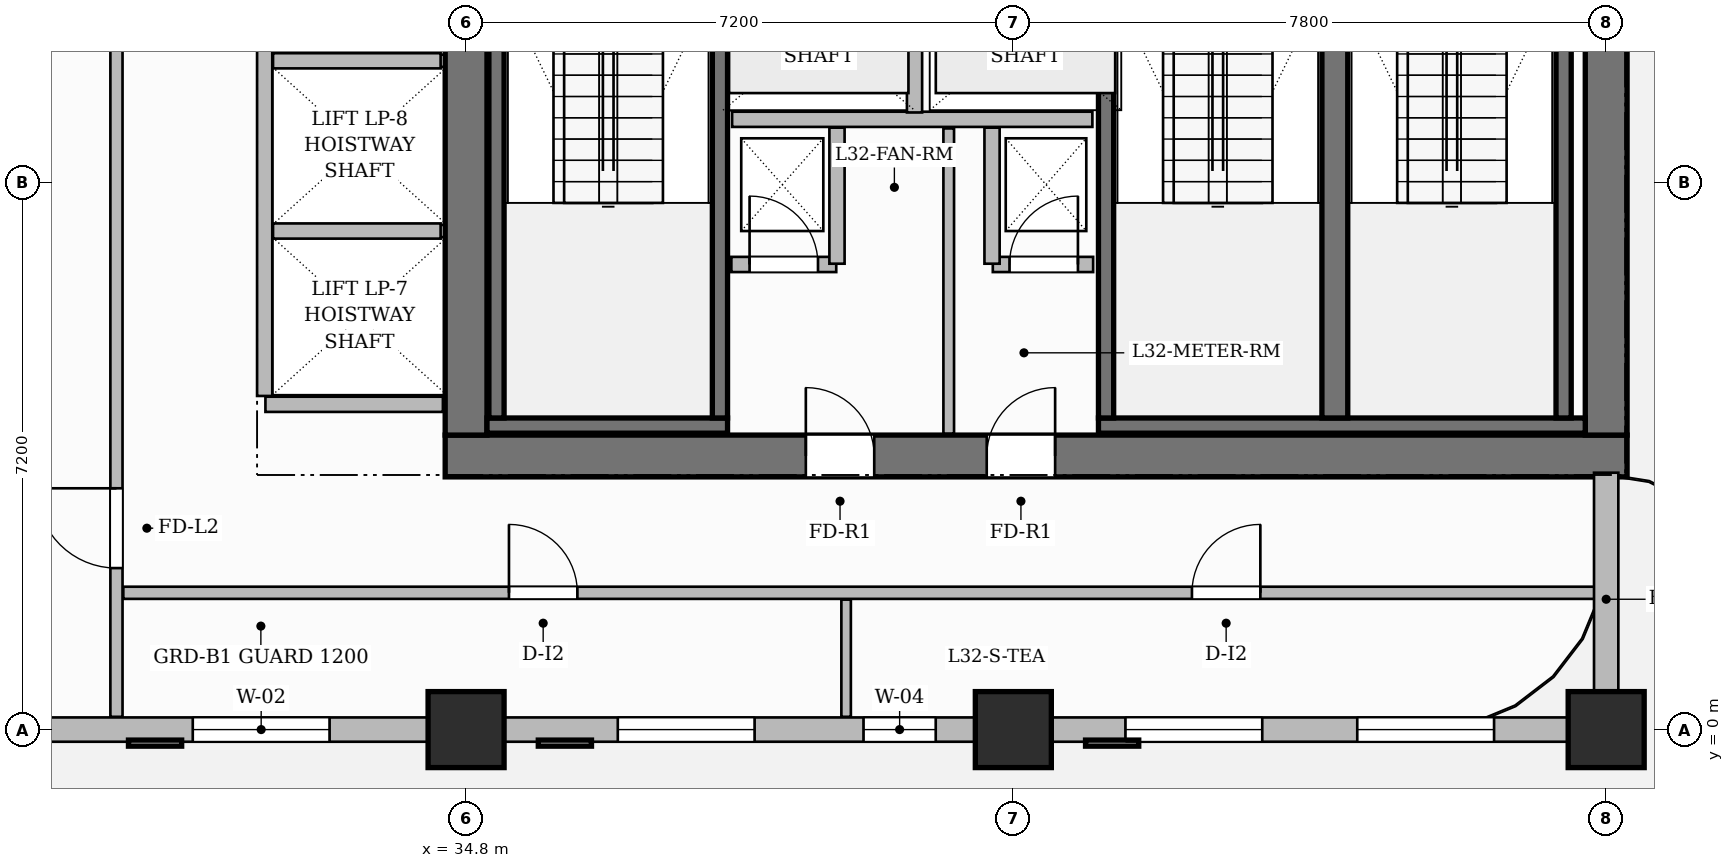
"""IFC4 building model, lengths in metres.
Left out: names, types, materials, properties, quantities, classifications, styles, units other than length and angle.
Written with IfcOpenShell. Run it as: python <this file> out.ifc"""

import sys

from ifc_helpers import new_model, si_unit, direction, frame, frame_2d, origin, origin_2d, place, context, subcontext, project, spatial, rectangle, extrude, source, transform, mapped, element, fill, save


model = new_model("IFC4")
c1 = context("Model", 3, precision=1e-05, world=origin(), true_north=direction((0.0, 1.0)))
c2 = subcontext(c1, "Body", "Model", "MODEL_VIEW")
j1 = project(units=[si_unit("LENGTHUNIT", "METRE"), si_unit("PLANEANGLEUNIT", "RADIAN")], contexts=[c1])
p1 = place(None, origin())
s1 = spatial("IfcSite", under=j1, at=p1, CompositionType="ELEMENT")
p2 = place(p1, origin())
s2 = spatial("IfcBuilding", under=s1, at=p2, CompositionType="ELEMENT")
p3 = place(p2, frame((0.0, 0.0, 130.3)))
s3 = spatial("IfcBuildingStorey", under=s2, at=p3, CompositionType="ELEMENT", Elevation=130.3)
p4 = place(p3, frame((34.525, 3.6, 0.0), z_axis=(0.0, 0.0, 1.0), x_axis=(1.0, 0.0, 0.0)))
e1 = element("IfcWall", 1, at=p4, inside=s3, PredefinedType="SHEAR", context=c2, shape_type="SweptSolid", body=[
    extrude(rectangle(XDim=15.55, YDim=0.55, at=frame_2d((7.775, 0.0))), origin(), (0.0, 0.0, 1.0), 3.7),
])
p5 = place(p4, frame((4.745, 0.0, 0.0)))
e2 = element("IfcOpeningElement", 2, at=p5, cuts=e1, PredefinedType="OPENING", context=c2, shape_type="SweptSolid", body=[
    extrude(rectangle(XDim=0.9, YDim=2.1, at=frame_2d((0.45, 1.05))), frame((0.0, 0.285, 0.0), z_axis=(0.0, -1.0, 0.0), x_axis=(1.0, 0.0, 0.0)), (0.0, 0.0, 1.0), 0.57),
])
p6 = place(p4, frame((7.125, 0.0, 0.0)))
e3 = element("IfcOpeningElement", 3, at=p6, cuts=e1, PredefinedType="OPENING", context=c2, shape_type="SweptSolid", body=[
    extrude(rectangle(XDim=0.9, YDim=2.1, at=frame_2d((0.45, 1.05))), frame((0.0, 0.285, 0.0), z_axis=(0.0, -1.0, 0.0), x_axis=(1.0, 0.0, 0.0)), (0.0, 0.0, 1.0), 0.57),
])
for number, where, z_axis, x_axis in (
    (4, (34.8, 3.875, 0.0), (0.0, 0.0, 1.0), (0.0, 1.0, 0.0)),
    (5, (49.8, 3.875, 0.0), (0.0, 0.0, 1.0), (0.0, 1.0, 0.0)),
):
    element("IfcWall", number, at=place(p3, frame(where, z_axis=z_axis, x_axis=x_axis)), inside=s3, PredefinedType="SHEAR", context=c2, shape_type="SweptSolid", body=[
        extrude(rectangle(XDim=10.25, YDim=0.55, at=frame_2d((5.125, 0.0))), origin(), (0.0, 0.0, 1.0), 3.7),
    ])
m1 = source(origin(), c2, "Body", "SweptSolid", [
    extrude(rectangle(XDim=1.0, YDim=1.0, at=origin_2d()), origin(), (0.0, 0.0, 1.0), 3.7),
])
for number, where, z_axis, x_axis in (
    (6, (34.8, 0.0, 0.0), (0.0, 0.0, 1.0), (1.0, 0.0, 0.0)),
    (7, (42.0, 0.0, 0.0), (0.0, 0.0, 1.0), (1.0, 0.0, 0.0)),
    (8, (49.8, 0.0, 0.0), (0.0, 0.0, 1.0), (1.0, 0.0, 0.0)),
):
    element("IfcColumn", number, at=place(p3, frame(where, z_axis=z_axis, x_axis=x_axis)), inside=s3, PredefinedType="COLUMN", context=c2, shape_type="MappedRepresentation", body=[
        mapped(m1, transform((0.0, 0.0, 0.0), scale=1.0)),
    ])
p7 = place(p3, frame((35.075, 4.0, 0.0), z_axis=(0.0, 0.0, 1.0), x_axis=(1.0, 0.0, 0.0)))
e9 = element("IfcWall", 9, at=p7, inside=s3, PredefinedType="SHEAR", context=c2, shape_type="SweptSolid", body=[
    extrude(rectangle(XDim=3.165, YDim=0.2, at=frame_2d((1.583, 0.0))), origin(), (0.0, 0.0, 1.0), 3.7),
])
for number, where, z_axis, x_axis in (
    (10, (35.2, 4.1, 0.0), (0.0, 0.0, 1.0), (0.0, 1.0, 0.0)),
    (11, (38.14, 4.1, 0.0), (0.0, 0.0, 1.0), (0.0, 1.0, 0.0)),
):
    element("IfcWall", number, at=place(p3, frame(where, z_axis=z_axis, x_axis=x_axis)), inside=s3, PredefinedType="SHEAR", context=c2, shape_type="SweptSolid", body=[
        extrude(rectangle(XDim=6.95, YDim=0.2, at=frame_2d((3.475, 0.0))), origin(), (0.0, 0.0, 1.0), 3.7),
    ])
p8 = place(p3, frame((43.12, 4.0, 0.0), z_axis=(0.0, 0.0, 1.0), x_axis=(1.0, 0.0, 0.0)))
e12 = element("IfcWall", 12, at=p8, inside=s3, PredefinedType="SHEAR", context=c2, shape_type="SweptSolid", body=[
    extrude(rectangle(XDim=6.405, YDim=0.2, at=frame_2d((3.202, 0.0))), origin(), (0.0, 0.0, 1.0), 3.7),
])
p9 = place(p3, frame((43.22, 4.1, 0.0), z_axis=(0.0, 0.0, 1.0), x_axis=(0.0, 1.0, 0.0)))
e13 = element("IfcWall", 13, at=p9, inside=s3, PredefinedType="SHEAR", context=c2, shape_type="SweptSolid", body=[
    extrude(rectangle(XDim=6.95, YDim=0.2, at=frame_2d((3.475, 0.0))), origin(), (0.0, 0.0, 1.0), 3.7),
])
p10 = place(p3, frame((46.23, 4.1, 0.0), z_axis=(0.0, 0.0, 1.0), x_axis=(0.0, 1.0, 0.0)))
e14 = element("IfcWall", 14, at=p10, inside=s3, PredefinedType="SHEAR", context=c2, shape_type="SweptSolid", body=[
    extrude(rectangle(XDim=6.95, YDim=0.34, at=frame_2d((3.475, 0.0))), origin(), (0.0, 0.0, 1.0), 3.7),
])
p11 = place(p3, frame((49.24, 4.1, 0.0), z_axis=(0.0, 0.0, 1.0), x_axis=(0.0, 1.0, 0.0)))
e15 = element("IfcWall", 15, at=p11, inside=s3, PredefinedType="SHEAR", context=c2, shape_type="SweptSolid", body=[
    extrude(rectangle(XDim=6.95, YDim=0.2, at=frame_2d((3.475, 0.0))), origin(), (0.0, 0.0, 1.0), 3.7),
])
p12 = place(p3, frame((38.3, 8.03, 0.0), z_axis=(0.0, 0.0, 1.0), x_axis=(1.0, 0.0, 0.0)))
e16 = element("IfcWall", 16, at=p12, inside=s3, PredefinedType="PARTITIONING", context=c2, shape_type="SweptSolid", body=[
    extrude(rectangle(XDim=4.74, YDim=0.2, at=frame_2d((2.37, 0.0))), origin(), (0.0, 0.0, 1.0), 3.45),
])
p13 = place(p3, frame((40.7, 8.12, 0.0), z_axis=(0.0, 0.0, 1.0), x_axis=(0.0, 1.0, 0.0)))
e17 = element("IfcWall", 17, at=p13, inside=s3, PredefinedType="PARTITIONING", context=c2, shape_type="SweptSolid", body=[
    extrude(rectangle(XDim=2.18, YDim=0.2, at=frame_2d((1.09, 0.0))), origin(), (0.0, 0.0, 1.0), 3.45),
])
p14 = place(p3, frame((38.29, 6.12, 0.0), z_axis=(0.0, 0.0, 1.0), x_axis=(1.0, 0.0, 0.0)))
e18 = element("IfcWall", 18, at=p14, inside=s3, PredefinedType="PARTITIONING", context=c2, shape_type="SweptSolid", body=[
    extrude(rectangle(XDim=1.38, YDim=0.2, at=frame_2d((0.69, 0.0))), origin(), (0.0, 0.0, 1.0), 3.45),
])
p15 = place(p14, frame((0.24, 0.0, 0.0)))
e19 = element("IfcOpeningElement", 19, at=p15, cuts=e18, PredefinedType="OPENING", context=c2, shape_type="SweptSolid", body=[
    extrude(rectangle(XDim=0.9, YDim=2.1, at=frame_2d((0.45, 1.05))), frame((0.0, 0.11, 0.0), z_axis=(0.0, -1.0, 0.0), x_axis=(1.0, 0.0, 0.0)), (0.0, 0.0, 1.0), 0.22),
])
p16 = place(p3, frame((39.68, 6.13, 0.0), z_axis=(0.0, 0.0, 1.0), x_axis=(0.0, 1.0, 0.0)))
e20 = element("IfcWall", 20, at=p16, inside=s3, PredefinedType="PARTITIONING", context=c2, shape_type="SweptSolid", body=[
    extrude(rectangle(XDim=1.79, YDim=0.2, at=frame_2d((0.895, 0.0))), origin(), (0.0, 0.0, 1.0), 3.45),
])
p17 = place(p3, frame((41.73, 6.12, 0.0), z_axis=(0.0, 0.0, 1.0), x_axis=(1.0, 0.0, 0.0)))
e21 = element("IfcWall", 21, at=p17, inside=s3, PredefinedType="PARTITIONING", context=c2, shape_type="SweptSolid", body=[
    extrude(rectangle(XDim=1.32, YDim=0.2, at=frame_2d((0.66, 0.0))), origin(), (0.0, 0.0, 1.0), 3.45),
])
p18 = place(p17, frame((0.22, 0.0, 0.0)))
e22 = element("IfcOpeningElement", 22, at=p18, cuts=e21, PredefinedType="OPENING", context=c2, shape_type="SweptSolid", body=[
    extrude(rectangle(XDim=0.9, YDim=2.1, at=frame_2d((0.45, 1.05))), frame((0.0, 0.11, 0.0), z_axis=(0.0, -1.0, 0.0), x_axis=(1.0, 0.0, 0.0)), (0.0, 0.0, 1.0), 0.22),
])
p19 = place(p3, frame((41.72, 6.13, 0.0), z_axis=(0.0, 0.0, 1.0), x_axis=(0.0, 1.0, 0.0)))
e23 = element("IfcWall", 23, at=p19, inside=s3, PredefinedType="PARTITIONING", context=c2, shape_type="SweptSolid", body=[
    extrude(rectangle(XDim=1.79, YDim=0.2, at=frame_2d((0.895, 0.0))), origin(), (0.0, 0.0, 1.0), 3.45),
])
p20 = place(p3, frame((41.15, 3.895, 0.0), z_axis=(0.0, 0.0, 1.0), x_axis=(0.0, 1.0, 0.0)))
e24 = element("IfcWall", 24, at=p20, inside=s3, PredefinedType="PARTITIONING", context=c2, shape_type="SweptSolid", body=[
    extrude(rectangle(XDim=4.015, YDim=0.14, at=frame_2d((2.007, 0.0))), origin(), (0.0, 0.0, 1.0), 3.45),
])
p21 = place(p3, frame((32.16, 4.28, 0.0), z_axis=(0.0, 0.0, 1.0), x_axis=(1.0, 0.0, 0.0)))
e25 = element("IfcWall", 25, at=p21, inside=s3, PredefinedType="PARTITIONING", context=c2, shape_type="SweptSolid", body=[
    extrude(rectangle(XDim=2.335, YDim=0.2, at=frame_2d((1.167, 0.0))), origin(), (0.0, 0.0, 1.0), 3.45),
])
p22 = place(p3, frame((32.15, 4.39, 0.0), z_axis=(0.0, 0.0, 1.0), x_axis=(0.0, 1.0, 0.0)))
e26 = element("IfcWall", 26, at=p22, inside=s3, PredefinedType="PARTITIONING", context=c2, shape_type="SweptSolid", body=[
    extrude(rectangle(XDim=8.82, YDim=0.2, at=frame_2d((4.41, 0.0))), origin(), (0.0, 0.0, 1.0), 3.45),
])
for number, where, z_axis, x_axis in (
    (27, (32.26, 6.56, 0.0), (0.0, 0.0, 1.0), (1.0, 0.0, 0.0)),
    (28, (32.26, 8.8, 0.0), (0.0, 0.0, 1.0), (1.0, 0.0, 0.0)),
):
    element("IfcWall", number, at=place(p3, frame(where, z_axis=z_axis, x_axis=x_axis)), inside=s3, PredefinedType="PARTITIONING", context=c2, shape_type="SweptSolid", body=[
        extrude(rectangle(XDim=2.205, YDim=0.2, at=frame_2d((1.103, 0.0))), origin(), (0.0, 0.0, 1.0), 3.45),
    ])
p23 = place(p3, frame((30.2, 0.168, 0.0), z_axis=(0.0, 0.0, 1.0), x_axis=(0.0, 1.0, 0.0)))
e29 = element("IfcWall", 29, at=p23, inside=s3, PredefinedType="PARTITIONING", context=c2, shape_type="SweptSolid", body=[
    extrude(rectangle(XDim=9.292, YDim=0.16, at=frame_2d((4.646, 0.0))), origin(), (0.0, 0.0, 1.0), 3.45),
])
p24 = place(p23, frame((1.957, 0.0, 0.0)))
e30 = element("IfcOpeningElement", 30, at=p24, cuts=e29, PredefinedType="OPENING", context=c2, shape_type="SweptSolid", body=[
    extrude(rectangle(XDim=1.05, YDim=2.15, at=frame_2d((0.525, 1.075))), frame((0.0, 0.09, 0.0), z_axis=(0.0, -1.0, 0.0), x_axis=(1.0, 0.0, 0.0)), (0.0, 0.0, 1.0), 0.18),
])
p25 = place(p3, frame((30.29, 1.8, 0.0), z_axis=(0.0, 0.0, 1.0), x_axis=(1.0, 0.0, 0.0)))
e31 = element("IfcWall", 31, at=p25, inside=s3, PredefinedType="PARTITIONING", context=c2, shape_type="SweptSolid", body=[
    extrude(rectangle(XDim=19.37, YDim=0.16, at=frame_2d((9.685, 0.0))), origin(), (0.0, 0.0, 1.0), 3.45),
])
p26 = place(p25, frame((5.074, 0.0, 0.0)))
e32 = element("IfcOpeningElement", 32, at=p26, cuts=e31, PredefinedType="OPENING", context=c2, shape_type="SweptSolid", body=[
    extrude(rectangle(XDim=0.9, YDim=2.15, at=frame_2d((0.45, 1.075))), frame((0.0, 0.09, 0.0), z_axis=(0.0, -1.0, 0.0), x_axis=(1.0, 0.0, 0.0)), (0.0, 0.0, 1.0), 0.18),
])
p27 = place(p25, frame((14.06, 0.0, 0.0)))
e33 = element("IfcOpeningElement", 33, at=p27, cuts=e31, PredefinedType="OPENING", context=c2, shape_type="SweptSolid", body=[
    extrude(rectangle(XDim=0.9, YDim=2.15, at=frame_2d((0.45, 1.075))), frame((0.0, 0.09, 0.0), z_axis=(0.0, -1.0, 0.0), x_axis=(1.0, 0.0, 0.0)), (0.0, 0.0, 1.0), 0.18),
])
p28 = place(p3, frame((39.8, 0.168, 0.0), z_axis=(0.0, 0.0, 1.0), x_axis=(0.0, 1.0, 0.0)))
e34 = element("IfcWall", 34, at=p28, inside=s3, PredefinedType="PARTITIONING", context=c2, shape_type="SweptSolid", body=[
    extrude(rectangle(XDim=1.542, YDim=0.125, at=frame_2d((0.771, 0.0))), origin(), (0.0, 0.0, 1.0), 3.45),
])
p29 = place(p3, frame((14.4, 0.0, 0.0), z_axis=(0.0, 0.0, 1.0), x_axis=(1.0, 0.0, 0.0)))
e35 = element("IfcWall", 35, at=p29, inside=s3, PredefinedType="SOLIDWALL", context=c2, shape_type="SweptSolid", body=[
    extrude(rectangle(XDim=35.4, YDim=0.32, at=frame_2d((17.7, 0.0))), origin(), (0.0, 0.0, 1.0), 2.935),
])
p30 = place(p29, frame((0.85, 0.0, 0.0)))
e36 = element("IfcOpeningElement", 36, at=p30, cuts=e35, PredefinedType="OPENING", context=c2, shape_type="SweptSolid", body=[
    extrude(rectangle(XDim=1.2, YDim=2.2, at=frame_2d((0.6, 1.1))), frame((0.0, 0.17, 0.0), z_axis=(0.0, -1.0, 0.0), x_axis=(1.0, 0.0, 0.0)), (0.0, 0.0, 1.0), 0.34),
])
p31 = place(p29, frame((2.811, 0.0, 0.8)))
e37 = element("IfcOpeningElement", 37, at=p31, cuts=e35, PredefinedType="OPENING", context=c2, shape_type="SweptSolid", body=[
    extrude(rectangle(XDim=1.8, YDim=1.85, at=frame_2d((0.9, 0.925))), frame((0.0, 0.17, 0.0), z_axis=(0.0, -1.0, 0.0), x_axis=(1.0, 0.0, 0.0)), (0.0, 0.0, 1.0), 0.34),
])
p32 = place(p29, frame((5.269, 0.0, 0.8)))
e38 = element("IfcOpeningElement", 38, at=p32, cuts=e35, PredefinedType="OPENING", context=c2, shape_type="SweptSolid", body=[
    extrude(rectangle(XDim=0.95, YDim=1.75, at=frame_2d((0.475, 0.875))), frame((0.0, 0.17, 0.0), z_axis=(0.0, -1.0, 0.0), x_axis=(1.0, 0.0, 0.0)), (0.0, 0.0, 1.0), 0.34),
])
p33 = place(p29, frame((8.389, 0.0, 0.8)))
e39 = element("IfcOpeningElement", 39, at=p33, cuts=e35, PredefinedType="OPENING", context=c2, shape_type="SweptSolid", body=[
    extrude(rectangle(XDim=1.8, YDim=1.85, at=frame_2d((0.9, 0.925))), frame((0.0, 0.17, 0.0), z_axis=(0.0, -1.0, 0.0), x_axis=(1.0, 0.0, 0.0)), (0.0, 0.0, 1.0), 0.34),
])
p34 = place(p29, frame((11.197, 0.0, 0.8)))
e40 = element("IfcOpeningElement", 40, at=p34, cuts=e35, PredefinedType="OPENING", context=c2, shape_type="SweptSolid", body=[
    extrude(rectangle(XDim=1.8, YDim=1.85, at=frame_2d((0.9, 0.925))), frame((0.0, 0.17, 0.0), z_axis=(0.0, -1.0, 0.0), x_axis=(1.0, 0.0, 0.0)), (0.0, 0.0, 1.0), 0.34),
])
p35 = place(p29, frame((16.804, 0.0, 0.8)))
e41 = element("IfcOpeningElement", 41, at=p35, cuts=e35, PredefinedType="OPENING", context=c2, shape_type="SweptSolid", body=[
    extrude(rectangle(XDim=1.8, YDim=1.85, at=frame_2d((0.9, 0.925))), frame((0.0, 0.17, 0.0), z_axis=(0.0, -1.0, 0.0), x_axis=(1.0, 0.0, 0.0)), (0.0, 0.0, 1.0), 0.34),
])
p36 = place(p29, frame((22.396, 0.0, 0.8)))
e42 = element("IfcOpeningElement", 42, at=p36, cuts=e35, PredefinedType="OPENING", context=c2, shape_type="SweptSolid", body=[
    extrude(rectangle(XDim=1.8, YDim=1.85, at=frame_2d((0.9, 0.925))), frame((0.0, 0.17, 0.0), z_axis=(0.0, -1.0, 0.0), x_axis=(1.0, 0.0, 0.0)), (0.0, 0.0, 1.0), 0.34),
])
p37 = place(p29, frame((25.629, 0.0, 0.8)))
e43 = element("IfcOpeningElement", 43, at=p37, cuts=e35, PredefinedType="OPENING", context=c2, shape_type="SweptSolid", body=[
    extrude(rectangle(XDim=0.95, YDim=1.75, at=frame_2d((0.475, 0.875))), frame((0.0, 0.17, 0.0), z_axis=(0.0, -1.0, 0.0), x_axis=(1.0, 0.0, 0.0)), (0.0, 0.0, 1.0), 0.34),
])
p38 = place(p29, frame((29.075, 0.0, 0.8)))
e44 = element("IfcOpeningElement", 44, at=p38, cuts=e35, PredefinedType="OPENING", context=c2, shape_type="SweptSolid", body=[
    extrude(rectangle(XDim=1.8, YDim=1.85, at=frame_2d((0.9, 0.925))), frame((0.0, 0.17, 0.0), z_axis=(0.0, -1.0, 0.0), x_axis=(1.0, 0.0, 0.0)), (0.0, 0.0, 1.0), 0.34),
])
p39 = place(p29, frame((32.125, 0.0, 0.8)))
e45 = element("IfcOpeningElement", 45, at=p39, cuts=e35, PredefinedType="OPENING", context=c2, shape_type="SweptSolid", body=[
    extrude(rectangle(XDim=1.8, YDim=1.85, at=frame_2d((0.9, 0.925))), frame((0.0, 0.17, 0.0), z_axis=(0.0, -1.0, 0.0), x_axis=(1.0, 0.0, 0.0)), (0.0, 0.0, 1.0), 0.34),
])
p40 = place(p3, frame((49.8, 0.05, 0.0), z_axis=(0.0, 0.0, 1.0), x_axis=(0.0, 1.0, 0.0)))
e46 = element("IfcWall", 46, at=p40, inside=s3, PredefinedType="SOLIDWALL", context=c2, shape_type="SweptSolid", body=[
    extrude(rectangle(XDim=3.33, YDim=0.32, at=frame_2d((1.665, 0.0))), origin(), (0.0, 0.0, 1.0), 3.45),
])
m2 = source(origin(), c2, "Body", "SweptSolid", [
    extrude(rectangle(XDim=0.9, YDim=2.1, at=frame_2d((0.45, 1.05))), frame((0.0, 0.025, 0.0), z_axis=(0.0, -1.0, 0.0), x_axis=(1.0, 0.0, 0.0)), (0.0, 0.0, 1.0), 0.05),
])
p41 = place(p15, origin())
e47 = element("IfcDoor", 47, at=p41, inside=s3, OperationType="SINGLE_SWING_LEFT", PredefinedType="DOOR", context=c2, shape_type="MappedRepresentation", body=[
    mapped(m2, transform((0.0, 0.0, 0.0), scale=1.0)),
])
fill(e19, e47)
p42 = place(p18, origin())
e48 = element("IfcDoor", 48, at=p42, inside=s3, OperationType="SINGLE_SWING_RIGHT", PredefinedType="DOOR", context=c2, shape_type="MappedRepresentation", body=[
    mapped(m2, transform((0.0, 0.0, 0.0), scale=1.0)),
])
fill(e22, e48)
p43 = place(p5, origin())
e49 = element("IfcDoor", 49, at=p43, inside=s3, OperationType="SINGLE_SWING_LEFT", PredefinedType="DOOR", context=c2, shape_type="MappedRepresentation", body=[
    mapped(m2, transform((0.0, 0.0, 0.0), scale=1.0)),
])
fill(e2, e49)
p44 = place(p6, origin())
e50 = element("IfcDoor", 50, at=p44, inside=s3, OperationType="SINGLE_SWING_RIGHT", PredefinedType="DOOR", context=c2, shape_type="MappedRepresentation", body=[
    mapped(m2, transform((0.0, 0.0, 0.0), scale=1.0)),
])
fill(e3, e50)
m3 = source(origin(), c2, "Body", "SweptSolid", [
    extrude(rectangle(XDim=1.05, YDim=2.15, at=frame_2d((0.525, 1.075))), frame((0.0, 0.025, 0.0), z_axis=(0.0, -1.0, 0.0), x_axis=(1.0, 0.0, 0.0)), (0.0, 0.0, 1.0), 0.05),
])
p45 = place(p24, origin())
e51 = element("IfcDoor", 51, at=p45, inside=s3, OperationType="SINGLE_SWING_RIGHT", PredefinedType="DOOR", context=c2, shape_type="MappedRepresentation", body=[
    mapped(m3, transform((0.0, 0.0, 0.0), scale=1.0)),
])
fill(e30, e51)
m4 = source(origin(), c2, "Body", "SweptSolid", [
    extrude(rectangle(XDim=0.9, YDim=2.15, at=frame_2d((0.45, 1.075))), frame((0.0, 0.025, 0.0), z_axis=(0.0, -1.0, 0.0), x_axis=(1.0, 0.0, 0.0)), (0.0, 0.0, 1.0), 0.05),
])
p46 = place(p26, origin())
e52 = element("IfcDoor", 52, at=p46, inside=s3, OperationType="SINGLE_SWING_LEFT", PredefinedType="DOOR", context=c2, shape_type="MappedRepresentation", body=[
    mapped(m4, transform((0.0, 0.0, 0.0), scale=1.0)),
])
fill(e32, e52)
p47 = place(p27, origin())
e53 = element("IfcDoor", 53, at=p47, inside=s3, OperationType="SINGLE_SWING_RIGHT", PredefinedType="DOOR", context=c2, shape_type="MappedRepresentation", body=[
    mapped(m4, transform((0.0, 0.0, 0.0), scale=1.0)),
])
fill(e33, e53)
m5 = source(origin(), c2, "Body", "SweptSolid", [
    extrude(rectangle(XDim=1.8, YDim=1.85, at=frame_2d((0.9, 0.925))), frame((0.0, 0.03, 0.0), z_axis=(0.0, -1.0, 0.0), x_axis=(1.0, 0.0, 0.0)), (0.0, 0.0, 1.0), 0.06),
])
p48 = place(p35, origin())
e54 = element("IfcWindow", 54, at=p48, inside=s3, PartitioningType="DOUBLE_PANEL_VERTICAL", PredefinedType="WINDOW", context=c2, shape_type="MappedRepresentation", body=[
    mapped(m5, transform((0.0, 0.0, 0.0), scale=1.0)),
])
fill(e41, e54)
p49 = place(p36, origin())
e55 = element("IfcWindow", 55, at=p49, inside=s3, PartitioningType="DOUBLE_PANEL_VERTICAL", PredefinedType="WINDOW", context=c2, shape_type="MappedRepresentation", body=[
    mapped(m5, transform((0.0, 0.0, 0.0), scale=1.0)),
])
fill(e42, e55)
m6 = source(origin(), c2, "Body", "SweptSolid", [
    extrude(rectangle(XDim=0.95, YDim=1.75, at=frame_2d((0.475, 0.875))), frame((0.0, 0.03, 0.0), z_axis=(0.0, -1.0, 0.0), x_axis=(1.0, 0.0, 0.0)), (0.0, 0.0, 1.0), 0.06),
])
p50 = place(p37, origin())
e56 = element("IfcWindow", 56, at=p50, inside=s3, PartitioningType="SINGLE_PANEL", PredefinedType="WINDOW", context=c2, shape_type="MappedRepresentation", body=[
    mapped(m6, transform((0.0, 0.0, 0.0), scale=1.0)),
])
fill(e43, e56)
p51 = place(p38, origin())
e57 = element("IfcWindow", 57, at=p51, inside=s3, PartitioningType="DOUBLE_PANEL_VERTICAL", PredefinedType="WINDOW", context=c2, shape_type="MappedRepresentation", body=[
    mapped(m5, transform((0.0, 0.0, 0.0), scale=1.0)),
])
fill(e44, e57)
p52 = place(p39, origin())
e58 = element("IfcWindow", 58, at=p52, inside=s3, PartitioningType="DOUBLE_PANEL_VERTICAL", PredefinedType="WINDOW", context=c2, shape_type="MappedRepresentation", body=[
    mapped(m5, transform((0.0, 0.0, 0.0), scale=1.0)),
])
fill(e45, e58)
save(model, sys.argv[1])
